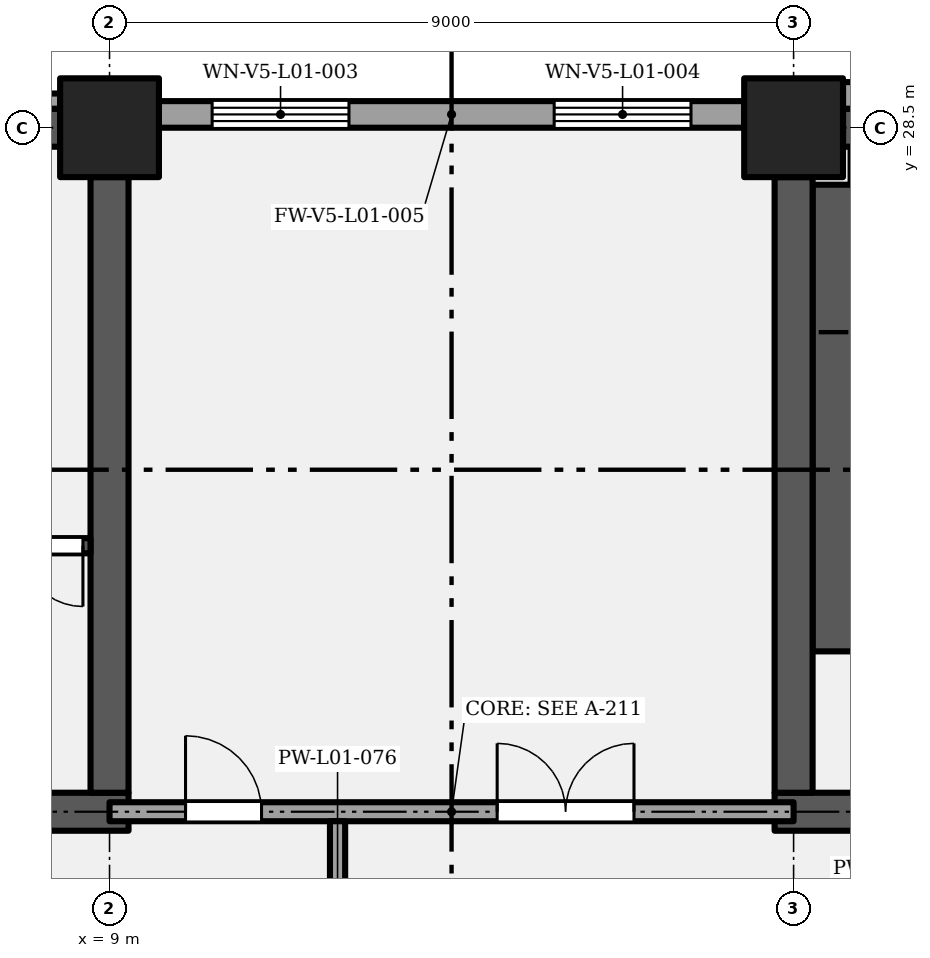
"""IFC4 building model, lengths in metres.
Left out: names, types, materials, properties, quantities, classifications, styles, units other than length and angle.
Written with IfcOpenShell. Run it as: python <this file> out.ifc"""

import sys

from ifc_helpers import new_model, si_unit, direction, frame, frame_2d, origin, origin_2d, place, context, subcontext, project, spatial, rectangle, extrude, element, fill, save


model = new_model("IFC4")
c1 = context("Model", 3, precision=1e-05, world=origin(), true_north=direction((0.0, 1.0)))
c2 = subcontext(c1, "Body", "Model", "MODEL_VIEW")
j1 = project(units=[si_unit("LENGTHUNIT", "METRE"), si_unit("PLANEANGLEUNIT", "RADIAN")], contexts=[c1])
p1 = place(None, origin())
s1 = spatial("IfcSite", under=j1, at=p1, CompositionType="ELEMENT")
p2 = place(p1, origin())
s2 = spatial("IfcBuilding", under=s1, at=p2, CompositionType="ELEMENT")
p3 = place(p2, frame((0.0, 0.0, 6.6)))
s3 = spatial("IfcBuildingStorey", under=s2, at=p3, CompositionType="ELEMENT", Elevation=6.6)
for number, where, z_axis, x_axis in (
    (1, (9.0, 28.5, 0.0), (0.0, 0.0, 1.0), (1.0, 0.0, 0.0)),
    (2, (18.0, 28.5, 0.0), (0.0, 0.0, 1.0), (1.0, 0.0, 0.0)),
):
    element("IfcColumn", number, at=place(p3, frame(where, z_axis=z_axis, x_axis=x_axis)), inside=s3, PredefinedType="COLUMN", context=c2, shape_type="SweptSolid", body=[
        extrude(rectangle(XDim=1.3, YDim=1.3, at=origin_2d()), origin(), (0.0, 0.0, 1.0), 5.4),
    ])
p4 = place(p3, frame((-0.25, 19.5, 0.0), z_axis=(0.0, 0.0, 1.0), x_axis=(1.0, 0.0, 0.0)))
e3 = element("IfcWall", 3, at=p4, inside=s3, PredefinedType="SHEAR", context=c2, shape_type="SweptSolid", body=[
    extrude(rectangle(XDim=9.5, YDim=0.5, at=frame_2d((4.75, 0.0))), origin(), (0.0, 0.0, 1.0), 5.1),
])
p5 = place(p4, frame((1.9, 0.0, 0.0)))
e4 = element("IfcOpeningElement", 4, at=p5, cuts=e3, PredefinedType="OPENING", context=c2, shape_type="SweptSolid", body=[
    extrude(rectangle(XDim=1.2, YDim=2.1, at=frame_2d((0.6, 1.05))), frame((0.0, 0.26, 0.0), z_axis=(0.0, -1.0, 0.0), x_axis=(1.0, 0.0, 0.0)), (0.0, 0.0, 1.0), 0.52),
])
p6 = place(p4, frame((6.4, 0.0, 0.0)))
e5 = element("IfcOpeningElement", 5, at=p6, cuts=e3, PredefinedType="OPENING", context=c2, shape_type="SweptSolid", body=[
    extrude(rectangle(XDim=1.2, YDim=2.1, at=frame_2d((0.6, 1.05))), frame((0.0, 0.26, 0.0), z_axis=(0.0, -1.0, 0.0), x_axis=(1.0, 0.0, 0.0)), (0.0, 0.0, 1.0), 0.52),
])
p7 = place(p3, frame((17.75, 19.5, 0.0), z_axis=(0.0, 0.0, 1.0), x_axis=(1.0, 0.0, 0.0)))
e6 = element("IfcWall", 6, at=p7, inside=s3, PredefinedType="SHEAR", context=c2, shape_type="SweptSolid", body=[
    extrude(rectangle(XDim=9.5, YDim=0.5, at=frame_2d((4.75, 0.0))), origin(), (0.0, 0.0, 1.0), 5.1),
])
p8 = place(p7, frame((1.9, 0.0, 0.0)))
e7 = element("IfcOpeningElement", 7, at=p8, cuts=e6, PredefinedType="OPENING", context=c2, shape_type="SweptSolid", body=[
    extrude(rectangle(XDim=1.2, YDim=2.1, at=frame_2d((0.6, 1.05))), frame((0.0, 0.26, 0.0), z_axis=(0.0, -1.0, 0.0), x_axis=(1.0, 0.0, 0.0)), (0.0, 0.0, 1.0), 0.52),
])
p9 = place(p7, frame((7.95, 0.0, 0.0), z_axis=(0.0, 0.0, 1.0), x_axis=(-1.0, 0.0, 0.0)))
e8 = element("IfcOpeningElement", 8, at=p9, cuts=e6, PredefinedType="OPENING", context=c2, shape_type="SweptSolid", body=[
    extrude(rectangle(XDim=1.8, YDim=2.1, at=frame_2d((0.9, 1.05))), frame((0.0, 0.26, 0.0), z_axis=(0.0, -1.0, 0.0), x_axis=(1.0, 0.0, 0.0)), (0.0, 0.0, 1.0), 0.52),
])
for number, where, z_axis, x_axis in (
    (9, (9.0, 19.75, 0.0), (0.0, 0.0, 1.0), (0.0, 1.0, 0.0)),
    (10, (18.0, 19.75, 0.0), (0.0, 0.0, 1.0), (0.0, 1.0, 0.0)),
):
    element("IfcWall", number, at=place(p3, frame(where, z_axis=z_axis, x_axis=x_axis)), inside=s3, PredefinedType="SHEAR", context=c2, shape_type="SweptSolid", body=[
        extrude(rectangle(XDim=8.1, YDim=0.5, at=frame_2d((4.05, 0.0))), origin(), (0.0, 0.0, 1.0), 5.1),
    ])
p10 = place(p3, frame((0.45, 28.5, 0.0), z_axis=(0.0, 0.0, 1.0), x_axis=(1.0, 0.0, 0.0)))
e11 = element("IfcWall", 11, at=p10, inside=s3, PredefinedType="SHEAR", context=c2, shape_type="SweptSolid", body=[
    extrude(rectangle(XDim=7.9, YDim=0.5, at=frame_2d((3.95, 0.0))), origin(), (0.0, 0.0, 1.0), 5.1),
])
p11 = place(p3, frame((18.65, 28.5, 0.0), z_axis=(0.0, 0.0, 1.0), x_axis=(1.0, 0.0, 0.0)))
e12 = element("IfcWall", 12, at=p11, inside=s3, PredefinedType="SHEAR", context=c2, shape_type="SweptSolid", body=[
    extrude(rectangle(XDim=7.7, YDim=0.5, at=frame_2d((3.85, 0.0))), origin(), (0.0, 0.0, 1.0), 5.1),
])
p12 = place(p3, frame((0.45, 28.85, 0.0), z_axis=(0.0, 0.0, 1.0), x_axis=(1.0, 0.0, 0.0)))
e13 = element("IfcWall", 13, at=p12, inside=s3, PredefinedType="SOLIDWALL", context=c2, shape_type="SweptSolid", body=[
    extrude(rectangle(XDim=7.9, YDim=0.2, at=frame_2d((3.95, 0.0))), origin(), (0.0, 0.0, 1.0), 5.1),
])
p13 = place(p3, frame((9.65, 28.675, 0.0), z_axis=(0.0, 0.0, 1.0), x_axis=(1.0, 0.0, 0.0)))
e14 = element("IfcWall", 14, at=p13, inside=s3, PredefinedType="SOLIDWALL", context=c2, shape_type="SweptSolid", body=[
    extrude(rectangle(XDim=7.7, YDim=0.35, at=frame_2d((3.85, 0.0))), origin(), (0.0, 0.0, 1.0), 5.1),
])
p14 = place(p13, frame((0.7, 0.0, 1.2)))
e15 = element("IfcOpeningElement", 15, at=p14, cuts=e14, PredefinedType="OPENING", context=c2, shape_type="SweptSolid", body=[
    extrude(rectangle(XDim=1.8, YDim=3.3, at=frame_2d((0.9, 1.65))), frame((0.0, 0.185, 0.0), z_axis=(0.0, -1.0, 0.0), x_axis=(1.0, 0.0, 0.0)), (0.0, 0.0, 1.0), 0.37),
])
p15 = place(p13, frame((5.2, 0.0, 1.2)))
e16 = element("IfcOpeningElement", 16, at=p15, cuts=e14, PredefinedType="OPENING", context=c2, shape_type="SweptSolid", body=[
    extrude(rectangle(XDim=1.8, YDim=3.3, at=frame_2d((0.9, 1.65))), frame((0.0, 0.185, 0.0), z_axis=(0.0, -1.0, 0.0), x_axis=(1.0, 0.0, 0.0)), (0.0, 0.0, 1.0), 0.37),
])
p16 = place(p3, frame((18.65, 28.925, 0.0), z_axis=(0.0, 0.0, 1.0), x_axis=(1.0, 0.0, 0.0)))
e17 = element("IfcWall", 17, at=p16, inside=s3, PredefinedType="SOLIDWALL", context=c2, shape_type="SweptSolid", body=[
    extrude(rectangle(XDim=7.7, YDim=0.35, at=frame_2d((3.85, 0.0))), origin(), (0.0, 0.0, 1.0), 5.1),
])
p17 = place(p3, frame((9.0, 19.5, 0.0), z_axis=(0.0, 0.0, 1.0), x_axis=(1.0, 0.0, 0.0)))
e18 = element("IfcWall", 18, at=p17, inside=s3, PredefinedType="PARTITIONING", context=c2, shape_type="SweptSolid", body=[
    extrude(rectangle(XDim=9.0, YDim=0.25, at=frame_2d((4.5, 0.0))), origin(), (0.0, 0.0, 1.0), 5.1),
])
p18 = place(p17, frame((5.1, 0.0, 0.0)))
e19 = element("IfcOpeningElement", 19, at=p18, cuts=e18, PredefinedType="OPENING", context=c2, shape_type="SweptSolid", body=[
    extrude(rectangle(XDim=1.8, YDim=2.4, at=frame_2d((0.9, 1.2))), frame((0.0, 0.135, 0.0), z_axis=(0.0, -1.0, 0.0), x_axis=(1.0, 0.0, 0.0)), (0.0, 0.0, 1.0), 0.27),
])
p19 = place(p17, frame((1.0, 0.0, 0.0)))
e20 = element("IfcOpeningElement", 20, at=p19, cuts=e18, PredefinedType="OPENING", context=c2, shape_type="SweptSolid", body=[
    extrude(rectangle(XDim=1.0, YDim=2.1, at=frame_2d((0.5, 1.05))), frame((0.0, 0.135, 0.0), z_axis=(0.0, -1.0, 0.0), x_axis=(1.0, 0.0, 0.0)), (0.0, 0.0, 1.0), 0.27),
])
p20 = place(p3, frame((7.5, 23.0, 0.0), z_axis=(0.0, 0.0, 1.0), x_axis=(1.0, 0.0, 0.0)))
e21 = element("IfcWall", 21, at=p20, inside=s3, PredefinedType="SHEAR", context=c2, shape_type="SweptSolid", body=[
    extrude(rectangle(XDim=1.25, YDim=0.2, at=frame_2d((0.625, 0.0))), origin(), (0.0, 0.0, 1.0), 5.1),
])
p21 = place(p20, frame((1.15, 0.0, 0.0), z_axis=(0.0, 0.0, 1.0), x_axis=(-1.0, 0.0, 0.0)))
e22 = element("IfcOpeningElement", 22, at=p21, cuts=e21, PredefinedType="OPENING", context=c2, shape_type="SweptSolid", body=[
    extrude(rectangle(XDim=0.8, YDim=2.0, at=frame_2d((0.4, 1.0))), frame((0.0, 0.11, 0.0), z_axis=(0.0, -1.0, 0.0), x_axis=(1.0, 0.0, 0.0)), (0.0, 0.0, 1.0), 0.22),
])
p22 = place(p3, frame((12.0, 17.225, 0.0), z_axis=(0.0, 0.0, 1.0), x_axis=(0.0, 1.0, 0.0)))
e23 = element("IfcWall", 23, at=p22, inside=s3, PredefinedType="PARTITIONING", context=c2, shape_type="SweptSolid", body=[
    extrude(rectangle(XDim=2.15, YDim=0.2, at=frame_2d((1.075, 0.0))), origin(), (0.0, 0.0, 1.0), 5.1),
])
p23 = place(p3, frame((18.6, 21.61, 0.0), z_axis=(0.0, 0.0, 1.0), x_axis=(0.0, 1.0, 0.0)))
e24 = element("IfcWall", 24, at=p23, inside=s3, PredefinedType="SHEAR", context=c2, shape_type="SweptSolid", body=[
    extrude(rectangle(XDim=6.14, YDim=0.7, at=frame_2d((3.07, 0.0))), origin(), (0.0, 0.0, 1.0), 2.587),
])
p24 = place(p14, origin())
e25 = element("IfcWindow", 25, at=p24, inside=s3, PartitioningType="SINGLE_PANEL", PredefinedType="WINDOW", context=c2, shape_type="SweptSolid", body=[
    extrude(rectangle(XDim=1.8, YDim=3.3, at=frame_2d((0.9, 1.65))), frame((0.0, 0.03, 0.0), z_axis=(0.0, -1.0, 0.0), x_axis=(1.0, 0.0, 0.0)), (0.0, 0.0, 1.0), 0.06),
])
fill(e15, e25)
p25 = place(p15, origin())
e26 = element("IfcWindow", 26, at=p25, inside=s3, PartitioningType="SINGLE_PANEL", PredefinedType="WINDOW", context=c2, shape_type="SweptSolid", body=[
    extrude(rectangle(XDim=1.8, YDim=3.3, at=frame_2d((0.9, 1.65))), frame((0.0, 0.03, 0.0), z_axis=(0.0, -1.0, 0.0), x_axis=(1.0, 0.0, 0.0)), (0.0, 0.0, 1.0), 0.06),
])
fill(e16, e26)
p26 = place(p21, origin())
e27 = element("IfcDoor", 27, at=p26, inside=s3, OperationType="SINGLE_SWING_LEFT", PredefinedType="DOOR", context=c2, shape_type="SweptSolid", body=[
    extrude(rectangle(XDim=0.8, YDim=2.0, at=frame_2d((0.4, 1.0))), frame((0.0, 0.025, 0.0), z_axis=(0.0, -1.0, 0.0), x_axis=(1.0, 0.0, 0.0)), (0.0, 0.0, 1.0), 0.05),
])
fill(e22, e27)
p27 = place(p18, origin())
e28 = element("IfcDoor", 28, at=p27, inside=s3, OperationType="DOUBLE_DOOR_SINGLE_SWING", PredefinedType="DOOR", context=c2, shape_type="SweptSolid", body=[
    extrude(rectangle(XDim=1.8, YDim=2.4, at=frame_2d((0.9, 1.2))), frame((0.0, 0.025, 0.0), z_axis=(0.0, -1.0, 0.0), x_axis=(1.0, 0.0, 0.0)), (0.0, 0.0, 1.0), 0.05),
])
fill(e19, e28)
p28 = place(p19, origin())
e29 = element("IfcDoor", 29, at=p28, inside=s3, OperationType="SINGLE_SWING_LEFT", PredefinedType="DOOR", context=c2, shape_type="SweptSolid", body=[
    extrude(rectangle(XDim=1.0, YDim=2.1, at=frame_2d((0.5, 1.05))), frame((0.0, 0.025, 0.0), z_axis=(0.0, -1.0, 0.0), x_axis=(1.0, 0.0, 0.0)), (0.0, 0.0, 1.0), 0.05),
])
fill(e20, e29)
save(model, sys.argv[1])
